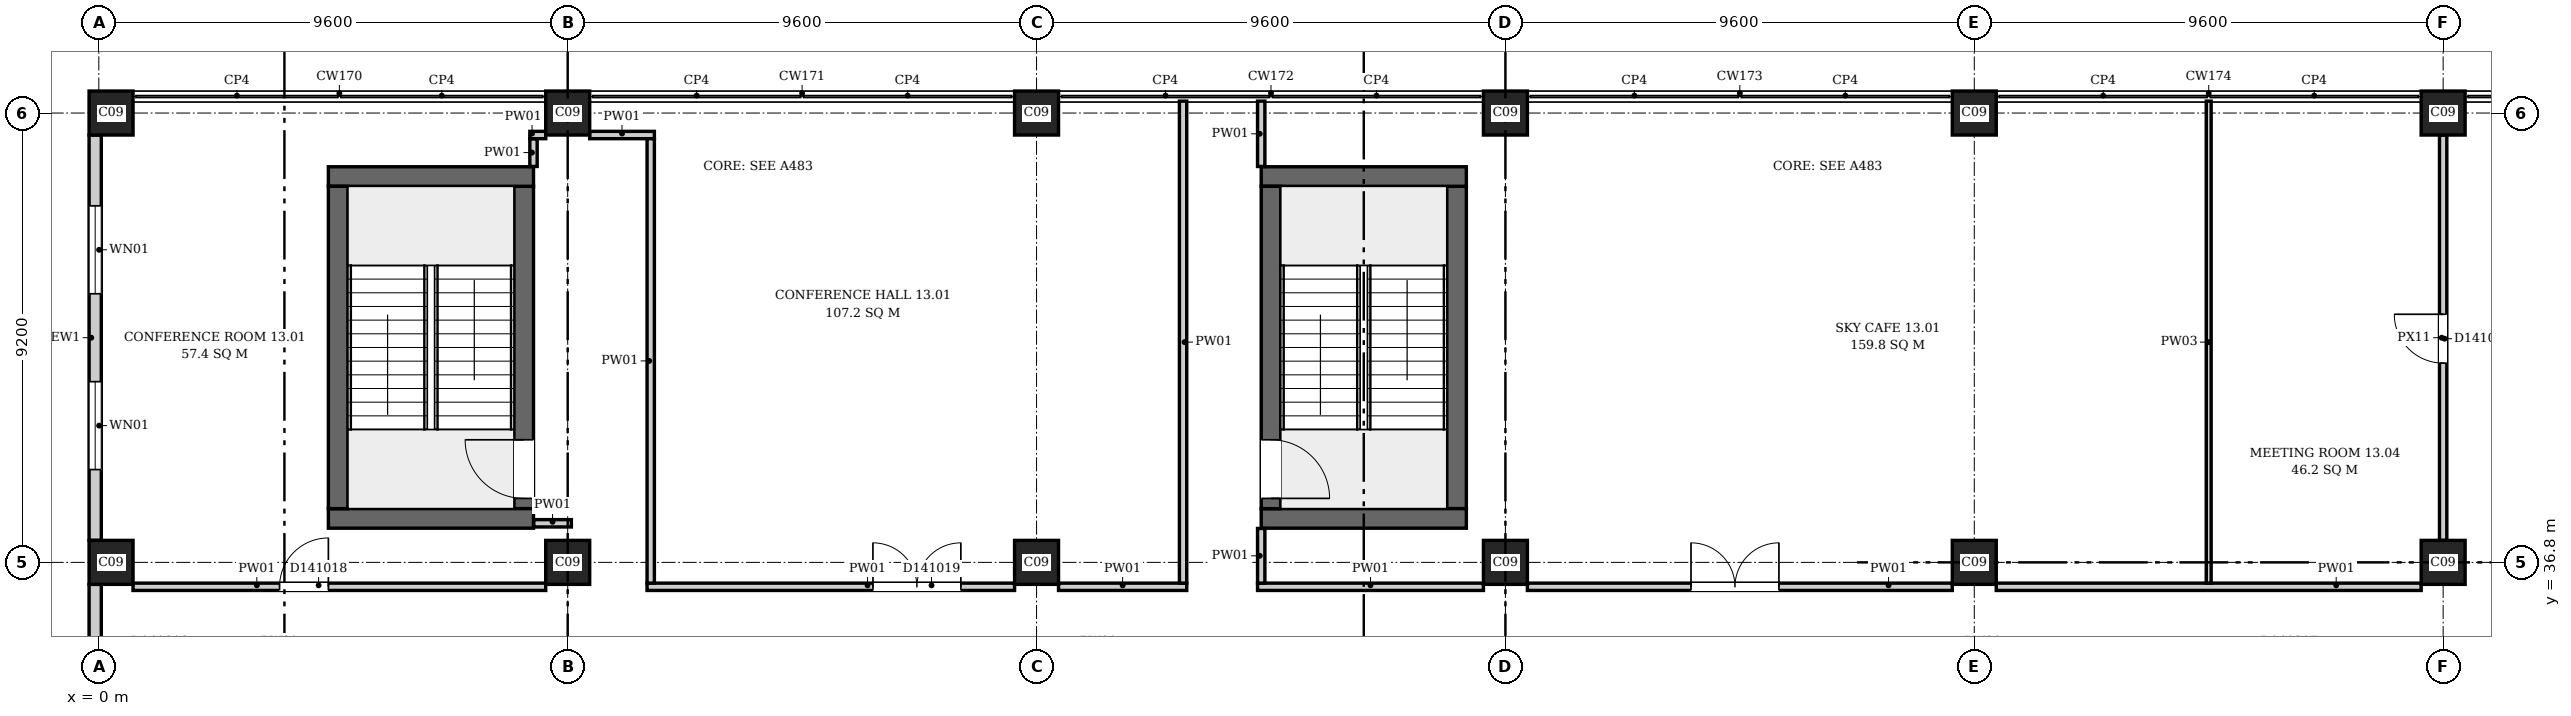
"""IFC4 building model, lengths in metres.
Left out: names, types, materials, properties, quantities, classifications, styles, units other than length and angle.
Written with IfcOpenShell. Run it as: python <this file> out.ifc"""

import sys

from ifc_helpers import new_model, si_unit, direction, frame, frame_2d, origin, origin_2d, place, context, subcontext, project, spatial, rectangle, extrude, element, fill, save


model = new_model("IFC4")
c1 = context("Model", 3, precision=1e-05, world=origin(), true_north=direction((0.0, 1.0)))
c2 = subcontext(c1, "Body", "Model", "MODEL_VIEW")
j1 = project(units=[si_unit("LENGTHUNIT", "METRE"), si_unit("PLANEANGLEUNIT", "RADIAN")], contexts=[c1])
p1 = place(None, origin())
s1 = spatial("IfcSite", under=j1, at=p1, CompositionType="ELEMENT")
p2 = place(p1, origin())
s2 = spatial("IfcBuilding", under=s1, at=p2, CompositionType="ELEMENT")
p3 = place(p2, frame((0.0, 0.0, 65.5)))
s3 = spatial("IfcBuildingStorey", under=s2, at=p3, CompositionType="ELEMENT", Elevation=65.5)
for number, where, z_axis, x_axis in (
    (1, (4.7, 37.7, 0.0), (0.0, 0.0, 1.0), (1.0, 0.0, 0.0)),
    (2, (4.7, 44.7, 0.0), (0.0, 0.0, 1.0), (1.0, 0.0, 0.0)),
):
    element("IfcWall", number, at=place(p3, frame(where, z_axis=z_axis, x_axis=x_axis)), inside=s3, PredefinedType="SHEAR", context=c2, shape_type="SweptSolid", body=[
        extrude(rectangle(XDim=4.2, YDim=0.4, at=frame_2d((2.1, 0.0))), origin(), (0.0, 0.0, 1.0), 4.2),
    ])
p4 = place(p3, frame((4.9, 37.9, 0.0), z_axis=(0.0, 0.0, 1.0), x_axis=(0.0, 1.0, 0.0)))
e3 = element("IfcWall", 3, at=p4, inside=s3, PredefinedType="SHEAR", context=c2, shape_type="SweptSolid", body=[
    extrude(rectangle(XDim=6.6, YDim=0.4, at=frame_2d((3.3, 0.0))), origin(), (0.0, 0.0, 1.0), 4.2),
])
p5 = place(p3, frame((8.7, 37.9, 0.0), z_axis=(0.0, 0.0, 1.0), x_axis=(0.0, 1.0, 0.0)))
e4 = element("IfcWall", 4, at=p5, inside=s3, PredefinedType="SHEAR", context=c2, shape_type="SweptSolid", body=[
    extrude(rectangle(XDim=6.6, YDim=0.4, at=frame_2d((3.3, 0.0))), origin(), (0.0, 0.0, 1.0), 4.2),
])
p6 = place(p5, frame((0.21, 0.0, 0.0)))
e5 = element("IfcOpeningElement", 5, at=p6, cuts=e4, PredefinedType="OPENING", context=c2, shape_type="SweptSolid", body=[
    extrude(rectangle(XDim=1.2, YDim=2.1, at=frame_2d((0.6, 1.05))), frame((0.0, 0.21, 0.0), z_axis=(0.0, -1.0, 0.0), x_axis=(1.0, 0.0, 0.0)), (0.0, 0.0, 1.0), 0.42),
])
for number, where, z_axis, x_axis in (
    (6, (23.8, 37.7, 0.0), (0.0, 0.0, 1.0), (1.0, 0.0, 0.0)),
    (7, (23.8, 44.7, 0.0), (0.0, 0.0, 1.0), (1.0, 0.0, 0.0)),
):
    element("IfcWall", number, at=place(p3, frame(where, z_axis=z_axis, x_axis=x_axis)), inside=s3, PredefinedType="SHEAR", context=c2, shape_type="SweptSolid", body=[
        extrude(rectangle(XDim=4.2, YDim=0.4, at=frame_2d((2.1, 0.0))), origin(), (0.0, 0.0, 1.0), 4.2),
    ])
p7 = place(p3, frame((24.0, 37.9, 0.0), z_axis=(0.0, 0.0, 1.0), x_axis=(0.0, 1.0, 0.0)))
e8 = element("IfcWall", 8, at=p7, inside=s3, PredefinedType="SHEAR", context=c2, shape_type="SweptSolid", body=[
    extrude(rectangle(XDim=6.6, YDim=0.4, at=frame_2d((3.3, 0.0))), origin(), (0.0, 0.0, 1.0), 4.2),
])
p8 = place(p7, frame((0.21, 0.0, 0.0)))
e9 = element("IfcOpeningElement", 9, at=p8, cuts=e8, PredefinedType="OPENING", context=c2, shape_type="SweptSolid", body=[
    extrude(rectangle(XDim=1.2, YDim=2.1, at=frame_2d((0.6, 1.05))), frame((0.0, 0.21, 0.0), z_axis=(0.0, -1.0, 0.0), x_axis=(1.0, 0.0, 0.0)), (0.0, 0.0, 1.0), 0.42),
])
p9 = place(p3, frame((27.8, 37.9, 0.0), z_axis=(0.0, 0.0, 1.0), x_axis=(0.0, 1.0, 0.0)))
e10 = element("IfcWall", 10, at=p9, inside=s3, PredefinedType="SHEAR", context=c2, shape_type="SweptSolid", body=[
    extrude(rectangle(XDim=6.6, YDim=0.4, at=frame_2d((3.3, 0.0))), origin(), (0.0, 0.0, 1.0), 4.2),
])
for number, where, z_axis, x_axis in (
    (11, (0.25, 36.8, 0.0), (0.0, 0.0, 1.0), (1.0, 0.0, 0.0)),
    (12, (9.6, 36.8, 0.0), (0.0, 0.0, 1.0), (1.0, 0.0, 0.0)),
    (13, (19.2, 36.8, 0.0), (0.0, 0.0, 1.0), (1.0, 0.0, 0.0)),
    (14, (28.8, 36.8, 0.0), (0.0, 0.0, 1.0), (1.0, 0.0, 0.0)),
    (15, (38.4, 36.8, 0.0), (0.0, 0.0, 1.0), (1.0, 0.0, 0.0)),
    (16, (48.0, 36.8, 0.0), (0.0, 0.0, 1.0), (1.0, 0.0, 0.0)),
    (17, (0.25, 46.0, 0.0), (0.0, 0.0, 1.0), (1.0, 0.0, 0.0)),
    (18, (9.6, 46.0, 0.0), (0.0, 0.0, 1.0), (1.0, 0.0, 0.0)),
    (19, (19.2, 46.0, 0.0), (0.0, 0.0, 1.0), (1.0, 0.0, 0.0)),
    (20, (28.8, 46.0, 0.0), (0.0, 0.0, 1.0), (1.0, 0.0, 0.0)),
    (21, (38.4, 46.0, 0.0), (0.0, 0.0, 1.0), (1.0, 0.0, 0.0)),
    (22, (48.0, 46.0, 0.0), (0.0, 0.0, 1.0), (1.0, 0.0, 0.0)),
):
    element("IfcColumn", number, at=place(p3, frame(where, z_axis=z_axis, x_axis=x_axis)), inside=s3, PredefinedType="COLUMN", context=c2, shape_type="SweptSolid", body=[
        extrude(rectangle(XDim=0.9, YDim=0.9, at=origin_2d()), origin(), (0.0, 0.0, 1.0), 4.2),
    ])
p10 = place(p3, frame((-0.074, 36.35, 0.0), z_axis=(0.0, 0.0, 1.0), x_axis=(0.0, -1.0, 0.0)))
e23 = element("IfcWall", 23, at=p10, inside=s3, PredefinedType="ELEMENTEDWALL", context=c2, shape_type="SweptSolid", body=[
    extrude(rectangle(XDim=8.3, YDim=0.25, at=frame_2d((4.15, 0.0))), origin(), (0.0, 0.0, 1.0), 3.9),
])
p11 = place(p10, frame((5.05, 0.0, 0.9)))
e24 = element("IfcOpeningElement", 24, at=p11, cuts=e23, PredefinedType="OPENING", context=c2, shape_type="SweptSolid", body=[
    extrude(rectangle(XDim=1.8, YDim=2.6, at=frame_2d((0.9, 1.3))), frame((0.0, 0.135, 0.0), z_axis=(0.0, -1.0, 0.0), x_axis=(1.0, 0.0, 0.0)), (0.0, 0.0, 1.0), 0.27),
])
p12 = place(p10, frame((1.7, 0.0, 0.9)))
e25 = element("IfcOpeningElement", 25, at=p12, cuts=e23, PredefinedType="OPENING", context=c2, shape_type="SweptSolid", body=[
    extrude(rectangle(XDim=1.8, YDim=2.6, at=frame_2d((0.9, 1.3))), frame((0.0, 0.135, 0.0), z_axis=(0.0, -1.0, 0.0), x_axis=(1.0, 0.0, 0.0)), (0.0, 0.0, 1.0), 0.27),
])
p13 = place(p3, frame((-0.074, 45.55, 0.0), z_axis=(0.0, 0.0, 1.0), x_axis=(0.0, -1.0, 0.0)))
e26 = element("IfcWall", 26, at=p13, inside=s3, PredefinedType="ELEMENTEDWALL", context=c2, shape_type="SweptSolid", body=[
    extrude(rectangle(XDim=8.3, YDim=0.25, at=frame_2d((4.15, 0.0))), origin(), (0.0, 0.0, 1.0), 3.9),
])
p14 = place(p13, frame((5.05, 0.0, 0.9)))
e27 = element("IfcOpeningElement", 27, at=p14, cuts=e26, PredefinedType="OPENING", context=c2, shape_type="SweptSolid", body=[
    extrude(rectangle(XDim=1.8, YDim=2.6, at=frame_2d((0.9, 1.3))), frame((0.0, 0.135, 0.0), z_axis=(0.0, -1.0, 0.0), x_axis=(1.0, 0.0, 0.0)), (0.0, 0.0, 1.0), 0.27),
])
p15 = place(p13, frame((1.45, 0.0, 0.9)))
e28 = element("IfcOpeningElement", 28, at=p15, cuts=e26, PredefinedType="OPENING", context=c2, shape_type="SweptSolid", body=[
    extrude(rectangle(XDim=1.8, YDim=2.6, at=frame_2d((0.9, 1.3))), frame((0.0, 0.135, 0.0), z_axis=(0.0, -1.0, 0.0), x_axis=(1.0, 0.0, 0.0)), (0.0, 0.0, 1.0), 0.27),
])
p16 = place(p3, frame((0.7, 36.3, 0.0), z_axis=(0.0, 0.0, 1.0), x_axis=(1.0, 0.0, 0.0)))
e29 = element("IfcWall", 29, at=p16, inside=s3, PredefinedType="PARTITIONING", context=c2, shape_type="SweptSolid", body=[
    extrude(rectangle(XDim=8.45, YDim=0.15, at=frame_2d((4.225, 0.0))), origin(), (0.0, 0.0, 1.0), 3.9),
])
p17 = place(p16, frame((3.0, 0.0, 0.0)))
e30 = element("IfcOpeningElement", 30, at=p17, cuts=e29, PredefinedType="OPENING", context=c2, shape_type="SweptSolid", body=[
    extrude(rectangle(XDim=1.0, YDim=2.1, at=frame_2d((0.5, 1.05))), frame((0.0, 0.085, 0.0), z_axis=(0.0, -1.0, 0.0), x_axis=(1.0, 0.0, 0.0)), (0.0, 0.0, 1.0), 0.17),
])
p18 = place(p3, frame((8.9, 44.906, 0.0), z_axis=(0.0, 0.0, 1.0), x_axis=(0.0, 1.0, 0.0)))
e31 = element("IfcWall", 31, at=p18, inside=s3, PredefinedType="PARTITIONING", context=c2, shape_type="SweptSolid", body=[
    extrude(rectangle(XDim=0.569, YDim=0.15, at=frame_2d((0.285, 0.0))), origin(), (0.0, 0.0, 1.0), 3.9),
])
p19 = place(p3, frame((8.825, 45.55, 0.0), z_axis=(0.0, 0.0, 1.0), x_axis=(1.0, 0.0, 0.0)))
e32 = element("IfcWall", 32, at=p19, inside=s3, PredefinedType="PARTITIONING", context=c2, shape_type="SweptSolid", body=[
    extrude(rectangle(XDim=0.325, YDim=0.15, at=frame_2d((0.163, 0.0))), origin(), (0.0, 0.0, 1.0), 3.9),
])
p20 = place(p3, frame((8.906, 37.6, 0.0), z_axis=(0.0, 0.0, 1.0), x_axis=(1.0, 0.0, 0.0)))
e33 = element("IfcWall", 33, at=p20, inside=s3, PredefinedType="PARTITIONING", context=c2, shape_type="SweptSolid", body=[
    extrude(rectangle(XDim=0.769, YDim=0.15, at=frame_2d((0.385, 0.0))), origin(), (0.0, 0.0, 1.0), 3.9),
])
p21 = place(p3, frame((10.05, 45.55, 0.0), z_axis=(0.0, 0.0, 1.0), x_axis=(1.0, 0.0, 0.0)))
e34 = element("IfcWall", 34, at=p21, inside=s3, PredefinedType="PARTITIONING", context=c2, shape_type="SweptSolid", body=[
    extrude(rectangle(XDim=1.325, YDim=0.15, at=frame_2d((0.663, 0.0))), origin(), (0.0, 0.0, 1.0), 3.9),
])
p22 = place(p3, frame((11.225, 36.3, 0.0), z_axis=(0.0, 0.0, 1.0), x_axis=(1.0, 0.0, 0.0)))
e35 = element("IfcWall", 35, at=p22, inside=s3, PredefinedType="PARTITIONING", context=c2, shape_type="SweptSolid", body=[
    extrude(rectangle(XDim=7.525, YDim=0.15, at=frame_2d((3.762, 0.0))), origin(), (0.0, 0.0, 1.0), 3.9),
])
p23 = place(p22, frame((4.625, 0.0, 0.0)))
e36 = element("IfcOpeningElement", 36, at=p23, cuts=e35, PredefinedType="OPENING", context=c2, shape_type="SweptSolid", body=[
    extrude(rectangle(XDim=1.8, YDim=2.1, at=frame_2d((0.9, 1.05))), frame((0.0, 0.085, 0.0), z_axis=(0.0, -1.0, 0.0), x_axis=(1.0, 0.0, 0.0)), (0.0, 0.0, 1.0), 0.17),
])
p24 = place(p3, frame((11.3, 36.375, 0.0), z_axis=(0.0, 0.0, 1.0), x_axis=(0.0, 1.0, 0.0)))
e37 = element("IfcWall", 37, at=p24, inside=s3, PredefinedType="PARTITIONING", context=c2, shape_type="SweptSolid", body=[
    extrude(rectangle(XDim=9.1, YDim=0.15, at=frame_2d((4.55, 0.0))), origin(), (0.0, 0.0, 1.0), 3.9),
])
p25 = place(p3, frame((19.65, 36.3, 0.0), z_axis=(0.0, 0.0, 1.0), x_axis=(1.0, 0.0, 0.0)))
e38 = element("IfcWall", 38, at=p25, inside=s3, PredefinedType="PARTITIONING", context=c2, shape_type="SweptSolid", body=[
    extrude(rectangle(XDim=2.625, YDim=0.15, at=frame_2d((1.312, 0.0))), origin(), (0.0, 0.0, 1.0), 3.9),
])
p26 = place(p3, frame((22.2, 36.375, 0.0), z_axis=(0.0, 0.0, 1.0), x_axis=(0.0, 1.0, 0.0)))
e39 = element("IfcWall", 39, at=p26, inside=s3, PredefinedType="PARTITIONING", context=c2, shape_type="SweptSolid", body=[
    extrude(rectangle(XDim=9.869, YDim=0.15, at=frame_2d((4.935, 0.0))), origin(), (0.0, 0.0, 1.0), 3.9),
])
p27 = place(p3, frame((23.725, 36.3, 0.0), z_axis=(0.0, 0.0, 1.0), x_axis=(1.0, 0.0, 0.0)))
e40 = element("IfcWall", 40, at=p27, inside=s3, PredefinedType="PARTITIONING", context=c2, shape_type="SweptSolid", body=[
    extrude(rectangle(XDim=4.625, YDim=0.15, at=frame_2d((2.312, 0.0))), origin(), (0.0, 0.0, 1.0), 3.9),
])
p28 = place(p3, frame((23.8, 36.375, 0.0), z_axis=(0.0, 0.0, 1.0), x_axis=(0.0, 1.0, 0.0)))
e41 = element("IfcWall", 41, at=p28, inside=s3, PredefinedType="PARTITIONING", context=c2, shape_type="SweptSolid", body=[
    extrude(rectangle(XDim=1.119, YDim=0.15, at=frame_2d((0.56, 0.0))), origin(), (0.0, 0.0, 1.0), 3.9),
])
p29 = place(p3, frame((23.8, 44.906, 0.0), z_axis=(0.0, 0.0, 1.0), x_axis=(0.0, 1.0, 0.0)))
e42 = element("IfcWall", 42, at=p29, inside=s3, PredefinedType="PARTITIONING", context=c2, shape_type="SweptSolid", body=[
    extrude(rectangle(XDim=1.338, YDim=0.15, at=frame_2d((0.669, 0.0))), origin(), (0.0, 0.0, 1.0), 3.9),
])
p30 = place(p3, frame((29.25, 36.3, 0.0), z_axis=(0.0, 0.0, 1.0), x_axis=(1.0, 0.0, 0.0)))
e43 = element("IfcWall", 43, at=p30, inside=s3, PredefinedType="PARTITIONING", context=c2, shape_type="SweptSolid", body=[
    extrude(rectangle(XDim=8.7, YDim=0.15, at=frame_2d((4.35, 0.0))), origin(), (0.0, 0.0, 1.0), 3.9),
])
p31 = place(p30, frame((3.35, 0.0, 0.0)))
e44 = element("IfcOpeningElement", 44, at=p31, cuts=e43, PredefinedType="OPENING", context=c2, shape_type="SweptSolid", body=[
    extrude(rectangle(XDim=1.8, YDim=2.1, at=frame_2d((0.9, 1.05))), frame((0.0, 0.085, 0.0), z_axis=(0.0, -1.0, 0.0), x_axis=(1.0, 0.0, 0.0)), (0.0, 0.0, 1.0), 0.17),
])
p32 = place(p3, frame((38.85, 36.3, 0.0), z_axis=(0.0, 0.0, 1.0), x_axis=(1.0, 0.0, 0.0)))
e45 = element("IfcWall", 45, at=p32, inside=s3, PredefinedType="PARTITIONING", context=c2, shape_type="SweptSolid", body=[
    extrude(rectangle(XDim=8.7, YDim=0.15, at=frame_2d((4.35, 0.0))), origin(), (0.0, 0.0, 1.0), 3.9),
])
p33 = place(p3, frame((43.2, 36.375, 0.0), z_axis=(0.0, 0.0, 1.0), x_axis=(0.0, 1.0, 0.0)))
e46 = element("IfcWall", 46, at=p33, inside=s3, PredefinedType="PARTITIONING", context=c2, shape_type="SweptSolid", body=[
    extrude(rectangle(XDim=9.869, YDim=0.1, at=frame_2d((4.935, 0.0))), origin(), (0.0, 0.0, 1.0), 3.9),
])
p34 = place(p3, frame((48.0, 37.25, 0.0), z_axis=(0.0, 0.0, 1.0), x_axis=(0.0, 1.0, 0.0)))
e47 = element("IfcWall", 47, at=p34, inside=s3, PredefinedType="PARTITIONING", context=c2, shape_type="SweptSolid", body=[
    extrude(rectangle(XDim=8.3, YDim=0.15, at=frame_2d((4.15, 0.0))), origin(), (0.0, 0.0, 1.0), 3.3),
])
p35 = place(p34, frame((3.63, 0.0, 0.0)))
e48 = element("IfcOpeningElement", 48, at=p35, cuts=e47, PredefinedType="OPENING", context=c2, shape_type="SweptSolid", body=[
    extrude(rectangle(XDim=1.0, YDim=2.1, at=frame_2d((0.5, 1.05))), frame((0.0, 0.085, 0.0), z_axis=(0.0, -1.0, 0.0), x_axis=(1.0, 0.0, 0.0)), (0.0, 0.0, 1.0), 0.17),
])
p36 = place(p14, origin())
e49 = element("IfcWindow", 49, at=p36, inside=s3, PartitioningType="SINGLE_PANEL", PredefinedType="WINDOW", context=c2, shape_type="SweptSolid", body=[
    extrude(rectangle(XDim=1.8, YDim=2.6, at=frame_2d((0.9, 1.3))), frame((0.0, 0.03, 0.0), z_axis=(0.0, -1.0, 0.0), x_axis=(1.0, 0.0, 0.0)), (0.0, 0.0, 1.0), 0.06),
])
fill(e27, e49)
p37 = place(p15, origin())
e50 = element("IfcWindow", 50, at=p37, inside=s3, PartitioningType="SINGLE_PANEL", PredefinedType="WINDOW", context=c2, shape_type="SweptSolid", body=[
    extrude(rectangle(XDim=1.8, YDim=2.6, at=frame_2d((0.9, 1.3))), frame((0.0, 0.03, 0.0), z_axis=(0.0, -1.0, 0.0), x_axis=(1.0, 0.0, 0.0)), (0.0, 0.0, 1.0), 0.06),
])
fill(e28, e50)
p38 = place(p6, origin())
e51 = element("IfcDoor", 51, at=p38, inside=s3, OperationType="SINGLE_SWING_RIGHT", PredefinedType="DOOR", context=c2, shape_type="SweptSolid", body=[
    extrude(rectangle(XDim=1.2, YDim=2.1, at=frame_2d((0.6, 1.05))), frame((0.0, 0.025, 0.0), z_axis=(0.0, -1.0, 0.0), x_axis=(1.0, 0.0, 0.0)), (0.0, 0.0, 1.0), 0.05),
])
fill(e5, e51)
p39 = place(p8, origin())
e52 = element("IfcDoor", 52, at=p39, inside=s3, OperationType="SINGLE_SWING_LEFT", PredefinedType="DOOR", context=c2, shape_type="SweptSolid", body=[
    extrude(rectangle(XDim=1.2, YDim=2.1, at=frame_2d((0.6, 1.05))), frame((0.0, 0.025, 0.0), z_axis=(0.0, -1.0, 0.0), x_axis=(1.0, 0.0, 0.0)), (0.0, 0.0, 1.0), 0.05),
])
fill(e9, e52)
p40 = place(p17, origin())
e53 = element("IfcDoor", 53, at=p40, inside=s3, OperationType="SINGLE_SWING_RIGHT", PredefinedType="DOOR", context=c2, shape_type="SweptSolid", body=[
    extrude(rectangle(XDim=1.0, YDim=2.1, at=frame_2d((0.5, 1.05))), frame((0.0, 0.025, 0.0), z_axis=(0.0, -1.0, 0.0), x_axis=(1.0, 0.0, 0.0)), (0.0, 0.0, 1.0), 0.05),
])
fill(e30, e53)
p41 = place(p23, origin())
e54 = element("IfcDoor", 54, at=p41, inside=s3, OperationType="DOUBLE_DOOR_SINGLE_SWING", PredefinedType="DOOR", context=c2, shape_type="SweptSolid", body=[
    extrude(rectangle(XDim=1.8, YDim=2.1, at=frame_2d((0.9, 1.05))), frame((0.0, 0.025, 0.0), z_axis=(0.0, -1.0, 0.0), x_axis=(1.0, 0.0, 0.0)), (0.0, 0.0, 1.0), 0.05),
])
fill(e36, e54)
p42 = place(p31, origin())
e55 = element("IfcDoor", 55, at=p42, inside=s3, OperationType="DOUBLE_DOOR_SINGLE_SWING", PredefinedType="DOOR", context=c2, shape_type="SweptSolid", body=[
    extrude(rectangle(XDim=1.8, YDim=2.1, at=frame_2d((0.9, 1.05))), frame((0.0, 0.025, 0.0), z_axis=(0.0, -1.0, 0.0), x_axis=(1.0, 0.0, 0.0)), (0.0, 0.0, 1.0), 0.05),
])
fill(e44, e55)
p43 = place(p35, origin())
e56 = element("IfcDoor", 56, at=p43, inside=s3, OperationType="SINGLE_SWING_LEFT", PredefinedType="DOOR", context=c2, shape_type="SweptSolid", body=[
    extrude(rectangle(XDim=1.0, YDim=2.1, at=frame_2d((0.5, 1.05))), frame((0.0, 0.025, 0.0), z_axis=(0.0, -1.0, 0.0), x_axis=(1.0, 0.0, 0.0)), (0.0, 0.0, 1.0), 0.05),
])
fill(e48, e56)
save(model, sys.argv[1])
